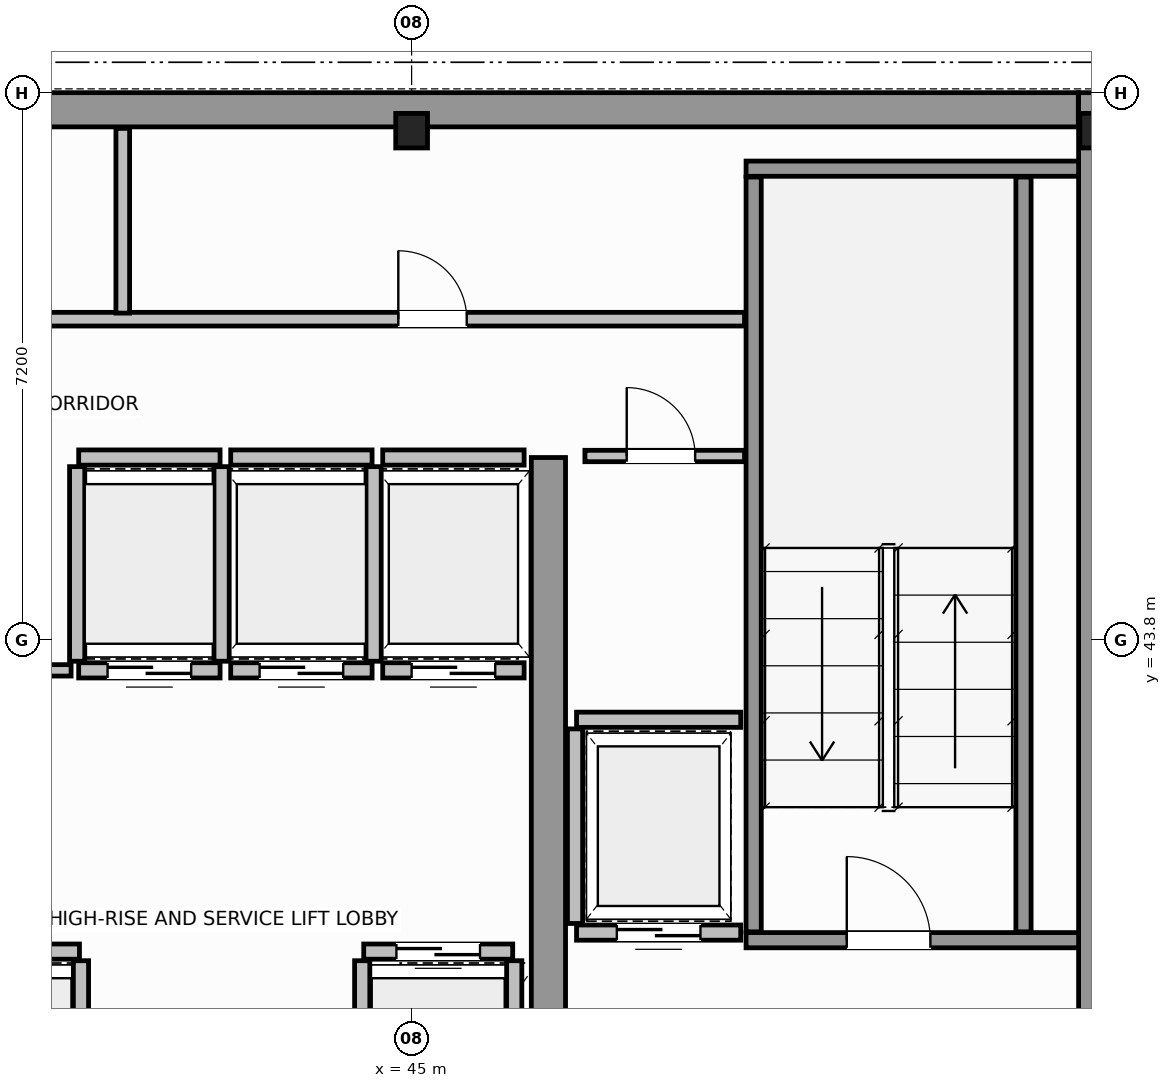
"""IFC4 building model, lengths in metres.
Left out: names, types, materials, properties, quantities, classifications, styles, units other than length and angle.
Written with IfcOpenShell. Run it as: python <this file> out.ifc"""

import sys

from ifc_helpers import new_model, si_unit, direction, frame, frame_2d, origin, origin_2d, place, context, subcontext, project, spatial, rectangle, i_section, extrude, source, transform, mapped, element, fill, save


model = new_model("IFC4")
c1 = context("Model", 3, precision=1e-05, world=origin(), true_north=direction((0.0, 1.0)))
c2 = subcontext(c1, "Body", "Model", "MODEL_VIEW")
j1 = project(units=[si_unit("LENGTHUNIT", "METRE"), si_unit("PLANEANGLEUNIT", "RADIAN")], contexts=[c1])
p1 = place(None, origin())
s1 = spatial("IfcSite", under=j1, at=p1, CompositionType="ELEMENT")
p2 = place(p1, origin())
s2 = spatial("IfcBuilding", under=s1, at=p2, CompositionType="ELEMENT")
p3 = place(p2, frame((0.0, 0.0, 253.6)))
s3 = spatial("IfcBuildingStorey", under=s2, at=p3, CompositionType="ELEMENT", Elevation=253.6)
m1 = source(origin(), c2, "Body", "SweptSolid", [
    extrude(i_section(OverallWidth=0.418, OverallDepth=0.455, WebThickness=0.042, FlangeThickness=0.058, FilletRadius=0.015, at=origin_2d()), origin(), (0.0, 0.0, 1.0), 3.8),
])
for number, where, z_axis, x_axis in (
    (1, (45.0, 50.5, 0.0), (0.0, 0.0, 1.0), (1.0, 0.0, 0.0)),
    (2, (54.0, 50.5, 0.0), (0.0, 0.0, 1.0), (1.0, 0.0, 0.0)),
):
    element("IfcColumn", number, at=place(p3, frame(where, z_axis=z_axis, x_axis=x_axis)), inside=s3, PredefinedType="COLUMN", context=c2, shape_type="MappedRepresentation", body=[
        mapped(m1, transform((0.0, 0.0, 0.0), scale=1.0)),
    ])
p4 = place(p3, frame((34.002, 50.775, 0.0), z_axis=(0.0, 0.0, 1.0), x_axis=(1.0, 0.0, 0.0)))
e3 = element("IfcWall", 3, at=p4, inside=s3, PredefinedType="SHEAR", context=c2, shape_type="SweptSolid", body=[
    extrude(rectangle(XDim=19.769, YDim=0.45, at=frame_2d((9.885, 0.0))), origin(), (0.0, 0.0, 1.0), 3.8),
])
p5 = place(p3, frame((54.0, 36.5, 0.0), z_axis=(0.0, 0.0, 1.0), x_axis=(0.0, 1.0, 0.0)))
e4 = element("IfcWall", 4, at=p5, inside=s3, PredefinedType="SHEAR", context=c2, shape_type="SweptSolid", body=[
    extrude(rectangle(XDim=14.5, YDim=0.45, at=frame_2d((7.25, 0.0))), origin(), (0.0, 0.0, 1.0), 3.8),
])
p6 = place(p3, frame((46.8, 36.745, 0.0), z_axis=(0.0, 0.0, 1.0), x_axis=(0.0, 1.0, 0.0)))
e5 = element("IfcWall", 5, at=p6, inside=s3, PredefinedType="SHEAR", context=c2, shape_type="SweptSolid", body=[
    extrude(rectangle(XDim=9.455, YDim=0.45, at=frame_2d((4.728, 0.0))), origin(), (0.0, 0.0, 1.0), 3.8),
])
p7 = place(p3, frame((49.4, 39.85, 0.0), z_axis=(0.0, 0.0, 1.0), x_axis=(1.0, 0.0, 0.0)))
e6 = element("IfcWall", 6, at=p7, inside=s3, PredefinedType="SOLIDWALL", context=c2, shape_type="SweptSolid", body=[
    extrude(rectangle(XDim=4.375, YDim=0.2, at=frame_2d((2.188, 0.0))), origin(), (0.0, 0.0, 1.0), 3.8),
])
p8 = place(p7, frame((1.325, 0.0, 0.0)))
e7 = element("IfcOpeningElement", 7, at=p8, cuts=e6, PredefinedType="OPENING", context=c2, shape_type="SweptSolid", body=[
    extrude(rectangle(XDim=1.1, YDim=2.15, at=frame_2d((0.55, 1.075))), frame((0.0, 0.11, 0.0), z_axis=(0.0, -1.0, 0.0), x_axis=(1.0, 0.0, 0.0)), (0.0, 0.0, 1.0), 0.22),
])
p9 = place(p3, frame((49.4, 50.0, 0.0), z_axis=(0.0, 0.0, 1.0), x_axis=(1.0, 0.0, 0.0)))
e8 = element("IfcWall", 8, at=p9, inside=s3, PredefinedType="SOLIDWALL", context=c2, shape_type="SweptSolid", body=[
    extrude(rectangle(XDim=4.375, YDim=0.2, at=frame_2d((2.188, 0.0))), origin(), (0.0, 0.0, 1.0), 3.8),
])
for number, where, z_axis, x_axis in (
    (9, (49.5, 39.96, 0.0), (0.0, 0.0, 1.0), (0.0, 1.0, 0.0)),
    (10, (53.05, 39.96, 0.0), (0.0, 0.0, 1.0), (0.0, 1.0, 0.0)),
):
    element("IfcWall", number, at=place(p3, frame(where, z_axis=z_axis, x_axis=x_axis)), inside=s3, PredefinedType="SOLIDWALL", context=c2, shape_type="SweptSolid", body=[
        extrude(rectangle(XDim=9.93, YDim=0.2, at=frame_2d((4.965, 0.0))), origin(), (0.0, 0.0, 1.0), 3.8),
    ])
p10 = place(p3, frame((38.67, 39.7, 0.0), z_axis=(0.0, 0.0, 1.0), x_axis=(1.0, 0.0, 0.0)))
e11 = element("IfcWall", 11, at=p10, inside=s3, PredefinedType="SOLIDWALL", context=c2, shape_type="SweptSolid", body=[
    extrude(rectangle(XDim=1.96, YDim=0.2, at=frame_2d((0.98, 0.0))), origin(), (0.0, 0.0, 1.0), 3.58),
])
p11 = place(p10, frame((0.43, 0.0, 0.0)))
e12 = element("IfcOpeningElement", 12, at=p11, cuts=e11, PredefinedType="OPENING", context=c2, shape_type="SweptSolid", body=[
    extrude(rectangle(XDim=1.1, YDim=2.15, at=frame_2d((0.55, 1.075))), frame((0.0, 0.11, 0.0), z_axis=(0.0, -1.0, 0.0), x_axis=(1.0, 0.0, 0.0)), (0.0, 0.0, 1.0), 0.22),
])
p12 = place(p3, frame((40.65, 37.02, 0.0), z_axis=(0.0, 0.0, 1.0), x_axis=(0.0, 1.0, 0.0)))
e13 = element("IfcWall", 13, at=p12, inside=s3, PredefinedType="SOLIDWALL", context=c2, shape_type="SweptSolid", body=[
    extrude(rectangle(XDim=2.56, YDim=0.2, at=frame_2d((1.28, 0.0))), origin(), (0.0, 0.0, 1.0), 3.58),
])
p13 = place(p3, frame((44.37, 39.7, 0.0), z_axis=(0.0, 0.0, 1.0), x_axis=(1.0, 0.0, 0.0)))
e14 = element("IfcWall", 14, at=p13, inside=s3, PredefinedType="SOLIDWALL", context=c2, shape_type="SweptSolid", body=[
    extrude(rectangle(XDim=1.96, YDim=0.2, at=frame_2d((0.98, 0.0))), origin(), (0.0, 0.0, 1.0), 3.58),
])
p14 = place(p13, frame((0.43, 0.0, 0.0)))
e15 = element("IfcOpeningElement", 15, at=p14, cuts=e14, PredefinedType="OPENING", context=c2, shape_type="SweptSolid", body=[
    extrude(rectangle(XDim=1.1, YDim=2.15, at=frame_2d((0.55, 1.075))), frame((0.0, 0.11, 0.0), z_axis=(0.0, -1.0, 0.0), x_axis=(1.0, 0.0, 0.0)), (0.0, 0.0, 1.0), 0.22),
])
for number, where, z_axis, x_axis in (
    (16, (44.35, 37.02, 0.0), (0.0, 0.0, 1.0), (0.0, 1.0, 0.0)),
    (17, (46.35, 37.02, 0.0), (0.0, 0.0, 1.0), (0.0, 1.0, 0.0)),
):
    element("IfcWall", number, at=place(p3, frame(where, z_axis=z_axis, x_axis=x_axis)), inside=s3, PredefinedType="SOLIDWALL", context=c2, shape_type="SweptSolid", body=[
        extrude(rectangle(XDim=2.56, YDim=0.2, at=frame_2d((1.28, 0.0))), origin(), (0.0, 0.0, 1.0), 3.58),
    ])
p15 = place(p3, frame((40.62, 43.4, 0.0), z_axis=(0.0, 0.0, 1.0), x_axis=(1.0, 0.0, 0.0)))
e18 = element("IfcWall", 18, at=p15, inside=s3, PredefinedType="SOLIDWALL", context=c2, shape_type="SweptSolid", body=[
    extrude(rectangle(XDim=1.86, YDim=0.2, at=frame_2d((0.93, 0.0))), origin(), (0.0, 0.0, 1.0), 3.58),
])
p16 = place(p15, frame((0.38, 0.0, 0.0)))
e19 = element("IfcOpeningElement", 19, at=p16, cuts=e18, PredefinedType="OPENING", context=c2, shape_type="SweptSolid", body=[
    extrude(rectangle(XDim=1.1, YDim=2.15, at=frame_2d((0.55, 1.075))), frame((0.0, 0.11, 0.0), z_axis=(0.0, -1.0, 0.0), x_axis=(1.0, 0.0, 0.0)), (0.0, 0.0, 1.0), 0.22),
])
p17 = place(p3, frame((40.62, 46.2, 0.0), z_axis=(0.0, 0.0, 1.0), x_axis=(1.0, 0.0, 0.0)))
e20 = element("IfcWall", 20, at=p17, inside=s3, PredefinedType="SOLIDWALL", context=c2, shape_type="SweptSolid", body=[
    extrude(rectangle(XDim=1.86, YDim=0.2, at=frame_2d((0.93, 0.0))), origin(), (0.0, 0.0, 1.0), 3.58),
])
for number, where, z_axis, x_axis in (
    (21, (40.6, 43.52, 0.0), (0.0, 0.0, 1.0), (0.0, 1.0, 0.0)),
    (22, (42.5, 43.52, 0.0), (0.0, 0.0, 1.0), (0.0, 1.0, 0.0)),
):
    element("IfcWall", number, at=place(p3, frame(where, z_axis=z_axis, x_axis=x_axis)), inside=s3, PredefinedType="SOLIDWALL", context=c2, shape_type="SweptSolid", body=[
        extrude(rectangle(XDim=2.56, YDim=0.2, at=frame_2d((1.28, 0.0))), origin(), (0.0, 0.0, 1.0), 3.58),
    ])
p18 = place(p3, frame((42.62, 43.4, 0.0), z_axis=(0.0, 0.0, 1.0), x_axis=(1.0, 0.0, 0.0)))
e23 = element("IfcWall", 23, at=p18, inside=s3, PredefinedType="SOLIDWALL", context=c2, shape_type="SweptSolid", body=[
    extrude(rectangle(XDim=1.86, YDim=0.2, at=frame_2d((0.93, 0.0))), origin(), (0.0, 0.0, 1.0), 3.58),
])
p19 = place(p18, frame((0.38, 0.0, 0.0)))
e24 = element("IfcOpeningElement", 24, at=p19, cuts=e23, PredefinedType="OPENING", context=c2, shape_type="SweptSolid", body=[
    extrude(rectangle(XDim=1.1, YDim=2.15, at=frame_2d((0.55, 1.075))), frame((0.0, 0.11, 0.0), z_axis=(0.0, -1.0, 0.0), x_axis=(1.0, 0.0, 0.0)), (0.0, 0.0, 1.0), 0.22),
])
p20 = place(p3, frame((42.62, 46.2, 0.0), z_axis=(0.0, 0.0, 1.0), x_axis=(1.0, 0.0, 0.0)))
e25 = element("IfcWall", 25, at=p20, inside=s3, PredefinedType="SOLIDWALL", context=c2, shape_type="SweptSolid", body=[
    extrude(rectangle(XDim=1.86, YDim=0.2, at=frame_2d((0.93, 0.0))), origin(), (0.0, 0.0, 1.0), 3.58),
])
p21 = place(p3, frame((44.5, 43.52, 0.0), z_axis=(0.0, 0.0, 1.0), x_axis=(0.0, 1.0, 0.0)))
e26 = element("IfcWall", 26, at=p21, inside=s3, PredefinedType="SOLIDWALL", context=c2, shape_type="SweptSolid", body=[
    extrude(rectangle(XDim=2.56, YDim=0.2, at=frame_2d((1.28, 0.0))), origin(), (0.0, 0.0, 1.0), 3.58),
])
p22 = place(p3, frame((44.62, 43.4, 0.0), z_axis=(0.0, 0.0, 1.0), x_axis=(1.0, 0.0, 0.0)))
e27 = element("IfcWall", 27, at=p22, inside=s3, PredefinedType="SOLIDWALL", context=c2, shape_type="SweptSolid", body=[
    extrude(rectangle(XDim=1.86, YDim=0.2, at=frame_2d((0.93, 0.0))), origin(), (0.0, 0.0, 1.0), 3.58),
])
p23 = place(p22, frame((0.38, 0.0, 0.0)))
e28 = element("IfcOpeningElement", 28, at=p23, cuts=e27, PredefinedType="OPENING", context=c2, shape_type="SweptSolid", body=[
    extrude(rectangle(XDim=1.1, YDim=2.15, at=frame_2d((0.55, 1.075))), frame((0.0, 0.11, 0.0), z_axis=(0.0, -1.0, 0.0), x_axis=(1.0, 0.0, 0.0)), (0.0, 0.0, 1.0), 0.22),
])
p24 = place(p3, frame((44.62, 46.2, 0.0), z_axis=(0.0, 0.0, 1.0), x_axis=(1.0, 0.0, 0.0)))
e29 = element("IfcWall", 29, at=p24, inside=s3, PredefinedType="SOLIDWALL", context=c2, shape_type="SweptSolid", body=[
    extrude(rectangle(XDim=1.86, YDim=0.2, at=frame_2d((0.93, 0.0))), origin(), (0.0, 0.0, 1.0), 3.58),
])
p25 = place(p3, frame((47.17, 39.95, 0.0), z_axis=(0.0, 0.0, 1.0), x_axis=(1.0, 0.0, 0.0)))
e30 = element("IfcWall", 30, at=p25, inside=s3, PredefinedType="SOLIDWALL", context=c2, shape_type="SweptSolid", body=[
    extrude(rectangle(XDim=2.16, YDim=0.2, at=frame_2d((1.08, 0.0))), origin(), (0.0, 0.0, 1.0), 3.58),
])
p26 = place(p25, frame((0.53, 0.0, 0.0)))
e31 = element("IfcOpeningElement", 31, at=p26, cuts=e30, PredefinedType="OPENING", context=c2, shape_type="SweptSolid", body=[
    extrude(rectangle(XDim=1.1, YDim=2.15, at=frame_2d((0.55, 1.075))), frame((0.0, 0.11, 0.0), z_axis=(0.0, -1.0, 0.0), x_axis=(1.0, 0.0, 0.0)), (0.0, 0.0, 1.0), 0.22),
])
p27 = place(p3, frame((47.17, 42.75, 0.0), z_axis=(0.0, 0.0, 1.0), x_axis=(1.0, 0.0, 0.0)))
e32 = element("IfcWall", 32, at=p27, inside=s3, PredefinedType="SOLIDWALL", context=c2, shape_type="SweptSolid", body=[
    extrude(rectangle(XDim=2.16, YDim=0.2, at=frame_2d((1.08, 0.0))), origin(), (0.0, 0.0, 1.0), 3.58),
])
p28 = place(p3, frame((47.15, 40.07, 0.0), z_axis=(0.0, 0.0, 1.0), x_axis=(0.0, 1.0, 0.0)))
e33 = element("IfcWall", 33, at=p28, inside=s3, PredefinedType="SOLIDWALL", context=c2, shape_type="SweptSolid", body=[
    extrude(rectangle(XDim=2.56, YDim=0.2, at=frame_2d((1.28, 0.0))), origin(), (0.0, 0.0, 1.0), 3.58),
])
p29 = place(p3, frame((47.28, 46.22, 0.0), z_axis=(0.0, 0.0, 1.0), x_axis=(1.0, 0.0, 0.0)))
e34 = element("IfcWall", 34, at=p29, inside=s3, PredefinedType="PARTITIONING", context=c2, shape_type="SweptSolid", body=[
    extrude(rectangle(XDim=2.1, YDim=0.15, at=frame_2d((1.05, 0.0))), origin(), (0.0, 0.0, 1.0), 3.58),
])
p30 = place(p29, frame((0.55, 0.0, 0.0)))
e35 = element("IfcOpeningElement", 35, at=p30, cuts=e34, PredefinedType="OPENING", context=c2, shape_type="SweptSolid", body=[
    extrude(rectangle(XDim=0.9, YDim=2.1, at=frame_2d((0.45, 1.05))), frame((0.0, 0.085, 0.0), z_axis=(0.0, -1.0, 0.0), x_axis=(1.0, 0.0, 0.0)), (0.0, 0.0, 1.0), 0.17),
])
p31 = place(p3, frame((38.92, 43.4, 0.0), z_axis=(0.0, 0.0, 1.0), x_axis=(1.0, 0.0, 0.0)))
e36 = element("IfcWall", 36, at=p31, inside=s3, PredefinedType="PARTITIONING", context=c2, shape_type="SweptSolid", body=[
    extrude(rectangle(XDim=1.6, YDim=0.15, at=frame_2d((0.8, 0.0))), origin(), (0.0, 0.0, 1.0), 3.58),
])
p32 = place(p31, frame((0.35, 0.0, 0.0)))
e37 = element("IfcOpeningElement", 37, at=p32, cuts=e36, PredefinedType="OPENING", context=c2, shape_type="SweptSolid", body=[
    extrude(rectangle(XDim=0.9, YDim=2.1, at=frame_2d((0.45, 1.05))), frame((0.0, 0.085, 0.0), z_axis=(0.0, -1.0, 0.0), x_axis=(1.0, 0.0, 0.0)), (0.0, 0.0, 1.0), 0.17),
])
p33 = place(p3, frame((18.62, 48.02, 0.0), z_axis=(0.0, 0.0, 1.0), x_axis=(1.0, 0.0, 0.0)))
e38 = element("IfcWall", 38, at=p33, inside=s3, PredefinedType="PLUMBINGWALL", context=c2, shape_type="SweptSolid", body=[
    extrude(rectangle(XDim=30.76, YDim=0.18, at=frame_2d((15.38, 0.0))), origin(), (0.0, 0.0, 1.0), 3.58),
])
p34 = place(p33, frame((1.955, 0.0, 0.0)))
e39 = element("IfcOpeningElement", 39, at=p34, cuts=e38, PredefinedType="OPENING", context=c2, shape_type="SweptSolid", body=[
    extrude(rectangle(XDim=0.9, YDim=2.15, at=frame_2d((0.45, 1.075))), frame((0.0, 0.1, 0.0), z_axis=(0.0, -1.0, 0.0), x_axis=(1.0, 0.0, 0.0)), (0.0, 0.0, 1.0), 0.2),
])
p35 = place(p33, frame((8.03, 0.0, 0.0)))
e40 = element("IfcOpeningElement", 40, at=p35, cuts=e38, PredefinedType="OPENING", context=c2, shape_type="SweptSolid", body=[
    extrude(rectangle(XDim=0.9, YDim=2.15, at=frame_2d((0.45, 1.075))), frame((0.0, 0.1, 0.0), z_axis=(0.0, -1.0, 0.0), x_axis=(1.0, 0.0, 0.0)), (0.0, 0.0, 1.0), 0.2),
])
p36 = place(p33, frame((16.93, 0.0, 0.0)))
e41 = element("IfcOpeningElement", 41, at=p36, cuts=e38, PredefinedType="OPENING", context=c2, shape_type="SweptSolid", body=[
    extrude(rectangle(XDim=0.9, YDim=2.15, at=frame_2d((0.45, 1.075))), frame((0.0, 0.1, 0.0), z_axis=(0.0, -1.0, 0.0), x_axis=(1.0, 0.0, 0.0)), (0.0, 0.0, 1.0), 0.2),
])
p37 = place(p33, frame((26.205, 0.0, 0.0)))
e42 = element("IfcOpeningElement", 42, at=p37, cuts=e38, PredefinedType="OPENING", context=c2, shape_type="SweptSolid", body=[
    extrude(rectangle(XDim=0.9, YDim=2.15, at=frame_2d((0.45, 1.075))), frame((0.0, 0.1, 0.0), z_axis=(0.0, -1.0, 0.0), x_axis=(1.0, 0.0, 0.0)), (0.0, 0.0, 1.0), 0.2),
])
p38 = place(p3, frame((41.2, 48.1, 0.0), z_axis=(0.0, 0.0, 1.0), x_axis=(0.0, 1.0, 0.0)))
e43 = element("IfcWall", 43, at=p38, inside=s3, PredefinedType="PLUMBINGWALL", context=c2, shape_type="SweptSolid", body=[
    extrude(rectangle(XDim=2.43, YDim=0.18, at=frame_2d((1.215, 0.0))), origin(), (0.0, 0.0, 1.0), 3.58),
])
m2 = source(origin(), c2, "Body", "SweptSolid", [
    extrude(rectangle(XDim=1.1, YDim=2.15, at=frame_2d((0.55, 1.075))), frame((0.0, 0.025, 0.0), z_axis=(0.0, -1.0, 0.0), x_axis=(1.0, 0.0, 0.0)), (0.0, 0.0, 1.0), 0.05),
])
p39 = place(p8, origin())
e44 = element("IfcDoor", 44, at=p39, inside=s3, OperationType="SINGLE_SWING_RIGHT", PredefinedType="DOOR", context=c2, shape_type="MappedRepresentation", body=[
    mapped(m2, transform((0.0, 0.0, 0.0), scale=1.0)),
])
fill(e7, e44)
p40 = place(p14, origin())
e45 = element("IfcDoor", 45, at=p40, inside=s3, OperationType="DOUBLE_DOOR_SLIDING", PredefinedType="DOOR", context=c2, shape_type="MappedRepresentation", body=[
    mapped(m2, transform((0.0, 0.0, 0.0), scale=1.0)),
])
fill(e15, e45)
p41 = place(p16, origin())
e46 = element("IfcDoor", 46, at=p41, inside=s3, OperationType="DOUBLE_DOOR_SLIDING", PredefinedType="DOOR", context=c2, shape_type="MappedRepresentation", body=[
    mapped(m2, transform((0.0, 0.0, 0.0), scale=1.0)),
])
fill(e19, e46)
p42 = place(p19, origin())
e47 = element("IfcDoor", 47, at=p42, inside=s3, OperationType="DOUBLE_DOOR_SLIDING", PredefinedType="DOOR", context=c2, shape_type="MappedRepresentation", body=[
    mapped(m2, transform((0.0, 0.0, 0.0), scale=1.0)),
])
fill(e24, e47)
p43 = place(p23, origin())
e48 = element("IfcDoor", 48, at=p43, inside=s3, OperationType="DOUBLE_DOOR_SLIDING", PredefinedType="DOOR", context=c2, shape_type="MappedRepresentation", body=[
    mapped(m2, transform((0.0, 0.0, 0.0), scale=1.0)),
])
fill(e28, e48)
p44 = place(p26, origin())
e49 = element("IfcDoor", 49, at=p44, inside=s3, OperationType="DOUBLE_DOOR_SLIDING", PredefinedType="DOOR", context=c2, shape_type="MappedRepresentation", body=[
    mapped(m2, transform((0.0, 0.0, 0.0), scale=1.0)),
])
fill(e31, e49)
m3 = source(origin(), c2, "Body", "SweptSolid", [
    extrude(rectangle(XDim=0.9, YDim=2.1, at=frame_2d((0.45, 1.05))), frame((0.0, 0.025, 0.0), z_axis=(0.0, -1.0, 0.0), x_axis=(1.0, 0.0, 0.0)), (0.0, 0.0, 1.0), 0.05),
])
p45 = place(p30, origin())
e50 = element("IfcDoor", 50, at=p45, inside=s3, OperationType="SINGLE_SWING_RIGHT", PredefinedType="DOOR", context=c2, shape_type="MappedRepresentation", body=[
    mapped(m3, transform((0.0, 0.0, 0.0), scale=1.0)),
])
fill(e35, e50)
m4 = source(origin(), c2, "Body", "SweptSolid", [
    extrude(rectangle(XDim=0.9, YDim=2.15, at=frame_2d((0.45, 1.075))), frame((0.0, 0.025, 0.0), z_axis=(0.0, -1.0, 0.0), x_axis=(1.0, 0.0, 0.0)), (0.0, 0.0, 1.0), 0.05),
])
p46 = place(p37, origin())
e51 = element("IfcDoor", 51, at=p46, inside=s3, OperationType="SINGLE_SWING_RIGHT", PredefinedType="DOOR", context=c2, shape_type="MappedRepresentation", body=[
    mapped(m4, transform((0.0, 0.0, 0.0), scale=1.0)),
])
fill(e42, e51)
save(model, sys.argv[1])
